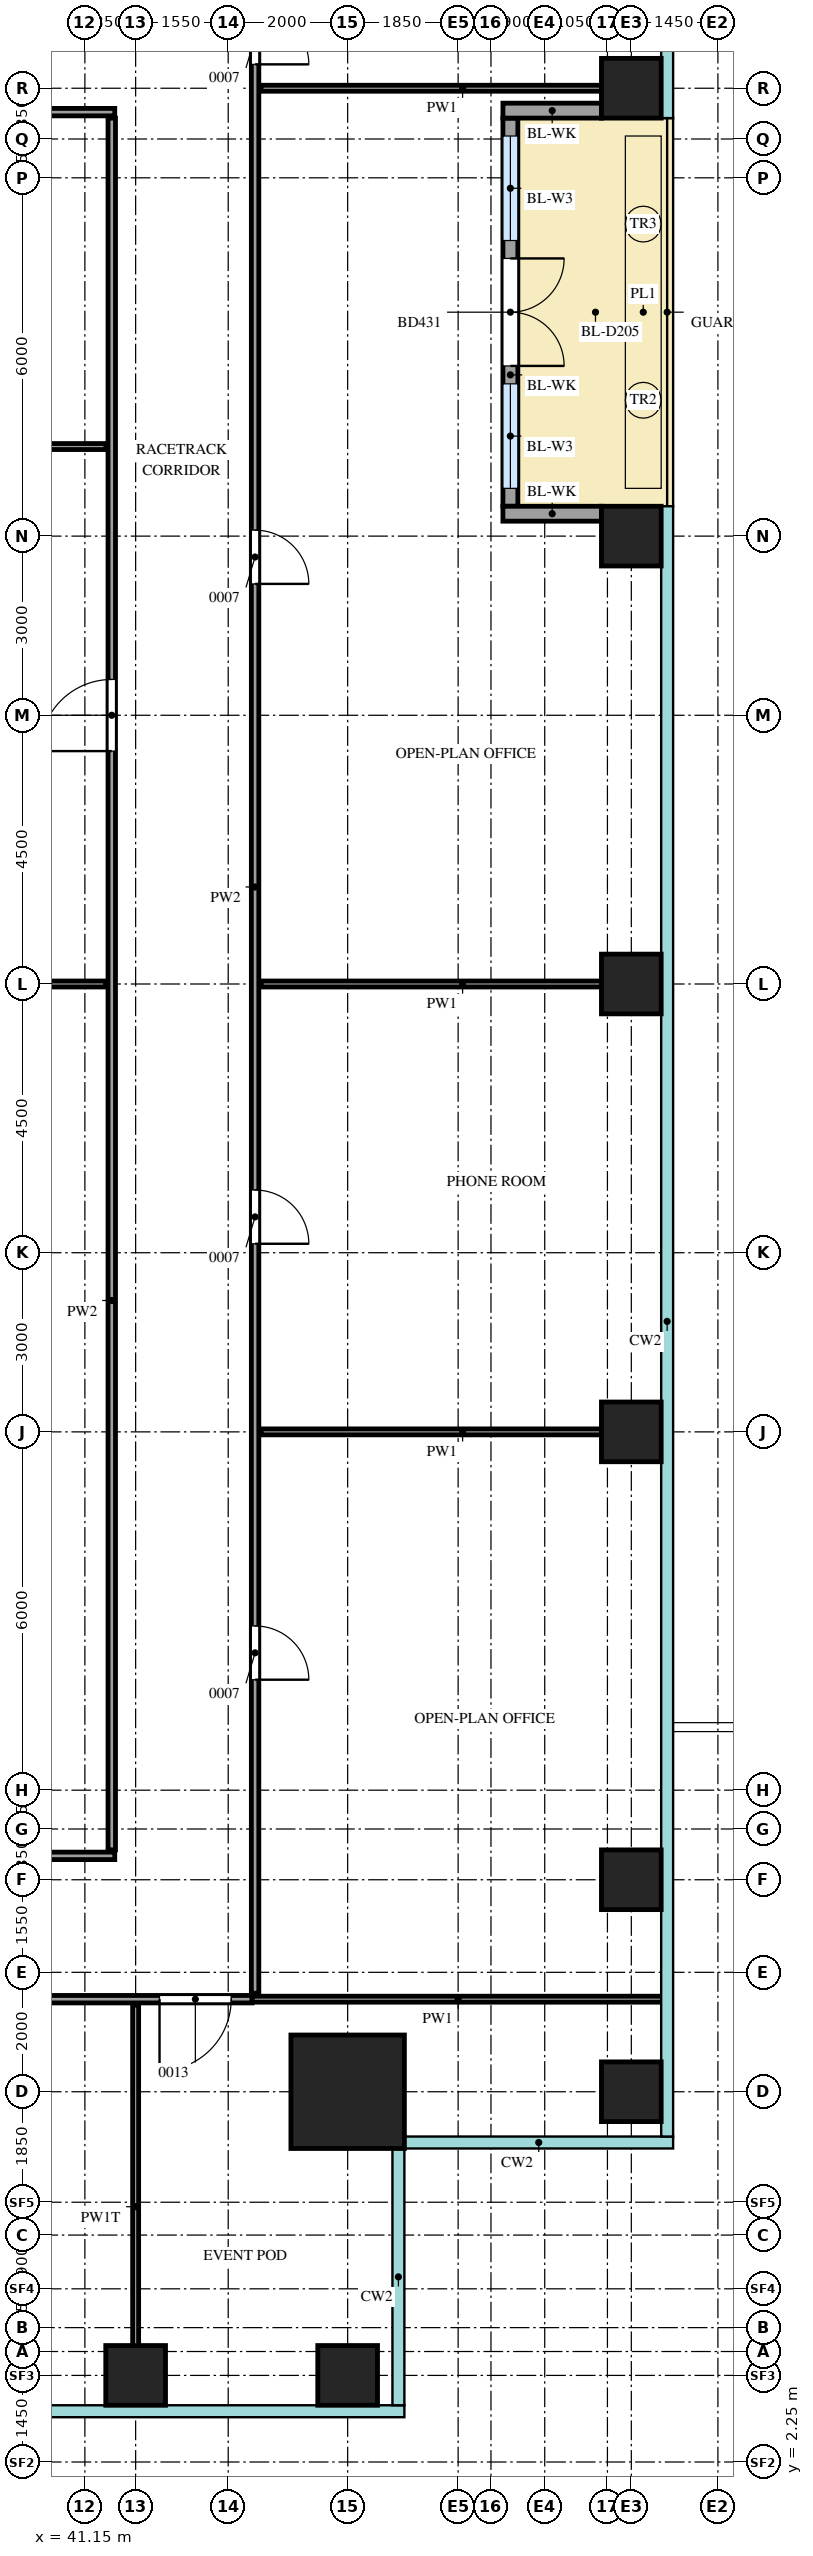
"""IFC4 building model, lengths in metres.
Left out: names, types, materials, properties, quantities, classifications, styles, units other than length and angle.
Written with IfcOpenShell. Run it as: python <this file> out.ifc"""

import sys

from ifc_helpers import new_model, si_unit, direction, frame, frame_2d, origin, origin_2d, place, context, subcontext, project, spatial, rectangle, extrude, source, transform, mapped, element, fill, save


model = new_model("IFC4")
c1 = context("Model", 3, precision=1e-05, world=origin(), true_north=direction((0.0, 1.0)))
c2 = subcontext(c1, "Body", "Model", "MODEL_VIEW")
j1 = project(units=[si_unit("LENGTHUNIT", "METRE"), si_unit("PLANEANGLEUNIT", "RADIAN")], contexts=[c1])
p1 = place(None, origin())
s1 = spatial("IfcSite", under=j1, at=p1, CompositionType="ELEMENT")
p2 = place(p1, origin())
s2 = spatial("IfcBuilding", under=s1, at=p2, CompositionType="ELEMENT")
p3 = place(p2, frame((0.0, 0.0, 196.7)))
s3 = spatial("IfcBuildingStorey", under=s2, at=p3, CompositionType="ELEMENT", Elevation=196.7)
m1 = source(origin(), c2, "Body", "SweptSolid", [
    extrude(rectangle(XDim=1.9, YDim=1.9, at=origin_2d()), origin(), (0.0, 0.0, 1.0), 4.0),
])
p4 = place(p3, frame((45.55, 8.45, 0.0), z_axis=(0.0, 0.0, 1.0), x_axis=(1.0, 0.0, 0.0)))
e1 = element("IfcColumn", 1, at=p4, inside=s3, PredefinedType="COLUMN", context=c2, shape_type="MappedRepresentation", body=[
    mapped(m1, transform((0.0, 0.0, 0.0))),
])
m2 = source(origin(), c2, "Body", "SweptSolid", [
    extrude(rectangle(XDim=1.0, YDim=1.0, at=origin_2d()), origin(), (0.0, 0.0, 1.0), 3.75),
])
for number, where, z_axis, x_axis in (
    (2, (42.0, 3.7, 0.0), (0.0, 0.0, 1.0), (1.0, 0.0, 0.0)),
    (3, (45.55, 3.7, 0.0), (0.0, 0.0, 1.0), (1.0, 0.0, 0.0)),
    (4, (50.3, 8.45, 0.0), (0.0, 0.0, 1.0), (1.0, 0.0, 0.0)),
    (5, (50.3, 12.0, 0.0), (0.0, 0.0, 1.0), (1.0, 0.0, 0.0)),
    (6, (50.3, 19.5, 0.0), (0.0, 0.0, 1.0), (1.0, 0.0, 0.0)),
    (7, (50.3, 27.0, 0.0), (0.0, 0.0, 1.0), (1.0, 0.0, 0.0)),
    (8, (50.3, 34.5, 0.0), (0.0, 0.0, 1.0), (1.0, 0.0, 0.0)),
    (9, (50.3, 42.0, 0.0), (0.0, 0.0, 1.0), (1.0, 0.0, 0.0)),
):
    element("IfcColumn", number, at=place(p3, frame(where, z_axis=z_axis, x_axis=x_axis)), inside=s3, PredefinedType="COLUMN", context=c2, shape_type="MappedRepresentation", body=[
        mapped(m2, transform((0.0, 0.0, 0.0))),
    ])
m3 = source(origin(), c2, "Body", "SweptSolid", [
    extrude(rectangle(XDim=6.5, YDim=0.25, at=frame_2d((3.25, 0.0))), origin(), (0.0, 0.0, 1.0), 3.15),
])
p5 = place(p3, frame((48.275, 35.0, 0.0), z_axis=(0.0, 0.0, 1.0), x_axis=(0.0, 1.0, 0.0)))
e10 = element("IfcWall", 10, at=p5, inside=s3, PredefinedType="SOLIDWALL", context=c2, shape_type="MappedRepresentation", body=[
    mapped(m3, transform((0.0, 0.0, 0.0))),
])
m4 = source(origin(), c2, "Body", "SweptSolid", [
    extrude(rectangle(XDim=1.75, YDim=2.4, at=frame_2d((0.875, 1.2))), frame((0.0, 0.135, 0.0), z_axis=(0.0, -1.0, 0.0), x_axis=(1.0, 0.0, 0.0)), (0.0, 0.0, 1.0), 0.27),
])
p6 = place(p5, frame((0.3, 0.0, 0.0)))
e11 = element("IfcOpeningElement", 11, at=p6, cuts=e10, PredefinedType="OPENING", context=c2, shape_type="MappedRepresentation", body=[
    mapped(m4, transform((0.0, 0.0, 0.0))),
])
p7 = place(p5, frame((4.45, 0.0, 0.0)))
e12 = element("IfcOpeningElement", 12, at=p7, cuts=e10, PredefinedType="OPENING", context=c2, shape_type="MappedRepresentation", body=[
    mapped(m4, transform((0.0, 0.0, 0.0))),
])
m5 = source(origin(), c2, "Body", "SweptSolid", [
    extrude(rectangle(XDim=1.8, YDim=2.4, at=frame_2d((0.9, 1.2))), frame((0.0, 0.135, 0.0), z_axis=(0.0, -1.0, 0.0), x_axis=(1.0, 0.0, 0.0)), (0.0, 0.0, 1.0), 0.27),
])
p8 = place(p5, frame((2.35, 0.0, 0.0)))
e13 = element("IfcOpeningElement", 13, at=p8, cuts=e10, PredefinedType="OPENING", context=c2, shape_type="MappedRepresentation", body=[
    mapped(m5, transform((0.0, 0.0, 0.0))),
])
m6 = source(origin(), c2, "Body", "SweptSolid", [
    extrude(rectangle(XDim=1.65, YDim=0.25, at=frame_2d((0.825, 0.0))), origin(), (0.0, 0.0, 1.0), 3.15),
])
for number, where, z_axis, x_axis in (
    (14, (49.8, 34.875, 0.0), (0.0, 0.0, 1.0), (-1.0, 0.0, 0.0)),
    (15, (49.8, 41.625, 0.0), (0.0, 0.0, 1.0), (-1.0, 0.0, 0.0)),
):
    element("IfcWall", number, at=place(p3, frame(where, z_axis=z_axis, x_axis=x_axis)), inside=s3, PredefinedType="SOLIDWALL", context=c2, shape_type="MappedRepresentation", body=[
        mapped(m6, transform((0.0, 0.0, 0.0))),
    ])
m7 = source(origin(), c2, "Body", "SweptSolid", [
    extrude(rectangle(XDim=6.75, YDim=0.1, at=frame_2d((3.375, 0.0))), origin(), (0.0, 0.0, 1.0), 3.3),
])
p9 = place(p3, frame((42.0, 3.15, 0.0), z_axis=(0.0, 0.0, 1.0), x_axis=(0.0, 1.0, 0.0)))
e16 = element("IfcWall", 16, at=p9, inside=s3, PredefinedType="PARTITIONING", context=c2, shape_type="MappedRepresentation", body=[
    mapped(m7, transform((0.0, 0.0, 0.0))),
])
m8 = source(origin(), c2, "Body", "SweptSolid", [
    extrude(rectangle(XDim=20.6, YDim=0.125, at=frame_2d((10.3, 0.0))), origin(), (0.0, 0.0, 1.0), 3.8),
])
p10 = place(p3, frame((23.35, 10.0, 0.0), z_axis=(0.0, 0.0, 1.0), x_axis=(1.0, 0.0, 0.0)))
e17 = element("IfcWall", 17, at=p10, inside=s3, PredefinedType="PARTITIONING", context=c2, shape_type="MappedRepresentation", body=[
    mapped(m8, transform((0.0, 0.0, 0.0))),
])
m9 = source(origin(), c2, "Body", "SweptSolid", [
    extrude(rectangle(XDim=0.9, YDim=2.1, at=frame_2d((0.45, 1.05))), frame((0.0, 0.073, 0.0), z_axis=(0.0, -1.0, 0.0), x_axis=(1.0, 0.0, 0.0)), (0.0, 0.0, 1.0), 0.145),
])
p11 = place(p10, frame((1.25, 0.0, 0.0)))
e18 = element("IfcOpeningElement", 18, at=p11, cuts=e17, PredefinedType="OPENING", context=c2, shape_type="MappedRepresentation", body=[
    mapped(m9, transform((0.0, 0.0, 0.0))),
])
m10 = source(origin(), c2, "Body", "SweptSolid", [
    extrude(rectangle(XDim=1.2, YDim=2.1, at=frame_2d((0.6, 1.05))), frame((0.0, 0.073, 0.0), z_axis=(0.0, -1.0, 0.0), x_axis=(1.0, 0.0, 0.0)), (0.0, 0.0, 1.0), 0.145),
])
p12 = place(p10, frame((10.55, 0.0, 0.0)))
e19 = element("IfcOpeningElement", 19, at=p12, cuts=e17, PredefinedType="OPENING", context=c2, shape_type="MappedRepresentation", body=[
    mapped(m10, transform((0.0, 0.0, 0.0))),
])
p13 = place(p10, frame((19.05, 0.0, 0.0)))
e20 = element("IfcOpeningElement", 20, at=p13, cuts=e17, PredefinedType="OPENING", context=c2, shape_type="MappedRepresentation", body=[
    mapped(m10, transform((0.0, 0.0, 0.0))),
])
m11 = source(origin(), c2, "Body", "SweptSolid", [
    extrude(rectangle(XDim=6.9, YDim=0.1, at=frame_2d((3.45, 0.0))), origin(), (0.0, 0.0, 1.0), 3.8),
])
p14 = place(p3, frame((43.95, 10.0, 0.0), z_axis=(0.0, 0.0, 1.0), x_axis=(1.0, 0.0, 0.0)))
e21 = element("IfcWall", 21, at=p14, inside=s3, PredefinedType="PARTITIONING", context=c2, shape_type="MappedRepresentation", body=[
    mapped(m11, transform((0.0, 0.0, 0.0))),
])
m12 = source(origin(), c2, "Body", "SweptSolid", [
    extrude(rectangle(XDim=33.8, YDim=0.125, at=frame_2d((16.9, 0.0))), origin(), (0.0, 0.0, 1.0), 3.8),
])
p15 = place(p3, frame((44.0, 10.1, 0.0), z_axis=(0.0, 0.0, 1.0), x_axis=(0.0, 1.0, 0.0)))
e22 = element("IfcWall", 22, at=p15, inside=s3, PredefinedType="PARTITIONING", context=c2, shape_type="MappedRepresentation", body=[
    mapped(m12, transform((0.0, 0.0, 0.0))),
])
p16 = place(p15, frame((5.25, 0.0, 0.0)))
e23 = element("IfcOpeningElement", 23, at=p16, cuts=e22, PredefinedType="OPENING", context=c2, shape_type="MappedRepresentation", body=[
    mapped(m9, transform((0.0, 0.0, 0.0))),
])
p17 = place(p15, frame((12.55, 0.0, 0.0)))
e24 = element("IfcOpeningElement", 24, at=p17, cuts=e22, PredefinedType="OPENING", context=c2, shape_type="MappedRepresentation", body=[
    mapped(m9, transform((0.0, 0.0, 0.0))),
])
p18 = place(p15, frame((23.6, 0.0, 0.0)))
e25 = element("IfcOpeningElement", 25, at=p18, cuts=e22, PredefinedType="OPENING", context=c2, shape_type="MappedRepresentation", body=[
    mapped(m9, transform((0.0, 0.0, 0.0))),
])
p19 = place(p15, frame((32.3, 0.0, 0.0)))
e26 = element("IfcOpeningElement", 26, at=p19, cuts=e22, PredefinedType="OPENING", context=c2, shape_type="MappedRepresentation", body=[
    mapped(m9, transform((0.0, 0.0, 0.0))),
])
m13 = source(origin(), c2, "Body", "SweptSolid", [
    extrude(rectangle(XDim=18.3, YDim=0.125, at=frame_2d((9.15, 0.0))), origin(), (0.0, 0.0, 1.0), 3.8),
])
p20 = place(p3, frame((23.35, 12.4, 0.0), z_axis=(0.0, 0.0, 1.0), x_axis=(1.0, 0.0, 0.0)))
e27 = element("IfcWall", 27, at=p20, inside=s3, PredefinedType="PARTITIONING", context=c2, shape_type="MappedRepresentation", body=[
    mapped(m13, transform((0.0, 0.0, 0.0))),
])
m14 = source(origin(), c2, "Body", "SweptSolid", [
    extrude(rectangle(XDim=29.0, YDim=0.125, at=frame_2d((14.5, 0.0))), origin(), (0.0, 0.0, 1.0), 3.8),
])
p21 = place(p3, frame((41.6, 12.5, 0.0), z_axis=(0.0, 0.0, 1.0), x_axis=(0.0, 1.0, 0.0)))
e28 = element("IfcWall", 28, at=p21, inside=s3, PredefinedType="PARTITIONING", context=c2, shape_type="MappedRepresentation", body=[
    mapped(m14, transform((0.0, 0.0, 0.0))),
])
p22 = place(p21, frame((18.4, 0.0, 0.0)))
e29 = element("IfcOpeningElement", 29, at=p22, cuts=e28, PredefinedType="OPENING", context=c2, shape_type="MappedRepresentation", body=[
    mapped(m10, transform((0.0, 0.0, 0.0))),
])
m15 = source(origin(), c2, "Body", "SweptSolid", [
    extrude(rectangle(XDim=6.75, YDim=0.1, at=frame_2d((3.375, 0.0))), origin(), (0.0, 0.0, 1.0), 3.8),
])
p23 = place(p3, frame((44.1, 19.5, 0.0), z_axis=(0.0, 0.0, 1.0), x_axis=(1.0, 0.0, 0.0)))
e30 = element("IfcWall", 30, at=p23, inside=s3, PredefinedType="PARTITIONING", context=c2, shape_type="MappedRepresentation", body=[
    mapped(m15, transform((0.0, 0.0, 0.0))),
])
m16 = source(origin(), c2, "Body", "SweptSolid", [
    extrude(rectangle(XDim=18.0, YDim=0.1, at=frame_2d((9.0, 0.0))), origin(), (0.0, 0.0, 1.0), 3.8),
])
p24 = place(p3, frame((23.5, 27.0, 0.0), z_axis=(0.0, 0.0, 1.0), x_axis=(1.0, 0.0, 0.0)))
e31 = element("IfcWall", 31, at=p24, inside=s3, PredefinedType="PARTITIONING", context=c2, shape_type="MappedRepresentation", body=[
    mapped(m16, transform((0.0, 0.0, 0.0))),
])
p25 = place(p3, frame((44.1, 27.0, 0.0), z_axis=(0.0, 0.0, 1.0), x_axis=(1.0, 0.0, 0.0)))
e32 = element("IfcWall", 32, at=p25, inside=s3, PredefinedType="PARTITIONING", context=c2, shape_type="MappedRepresentation", body=[
    mapped(m15, transform((0.0, 0.0, 0.0))),
])
m17 = source(origin(), c2, "Body", "SweptSolid", [
    extrude(rectangle(XDim=10.95, YDim=0.1, at=frame_2d((5.475, 0.0))), origin(), (0.0, 0.0, 1.0), 3.8),
])
p26 = place(p3, frame((30.55, 36.0, 0.0), z_axis=(0.0, 0.0, 1.0), x_axis=(1.0, 0.0, 0.0)))
e33 = element("IfcWall", 33, at=p26, inside=s3, PredefinedType="PARTITIONING", context=c2, shape_type="MappedRepresentation", body=[
    mapped(m17, transform((0.0, 0.0, 0.0))),
])
m18 = source(origin(), c2, "Body", "SweptSolid", [
    extrude(rectangle(XDim=11.1, YDim=0.125, at=frame_2d((5.55, 0.0))), origin(), (0.0, 0.0, 1.0), 3.8),
])
p27 = place(p3, frame((30.55, 41.6, 0.0), z_axis=(0.0, 0.0, 1.0), x_axis=(1.0, 0.0, 0.0)))
e34 = element("IfcWall", 34, at=p27, inside=s3, PredefinedType="PARTITIONING", context=c2, shape_type="MappedRepresentation", body=[
    mapped(m18, transform((0.0, 0.0, 0.0))),
])
p28 = place(p27, frame((5.25, 0.0, 0.0)))
e35 = element("IfcOpeningElement", 35, at=p28, cuts=e34, PredefinedType="OPENING", context=c2, shape_type="MappedRepresentation", body=[
    mapped(m9, transform((0.0, 0.0, 0.0))),
])
p29 = place(p3, frame((44.1, 42.0, 0.0), z_axis=(0.0, 0.0, 1.0), x_axis=(1.0, 0.0, 0.0)))
e36 = element("IfcWall", 36, at=p29, inside=s3, PredefinedType="PARTITIONING", context=c2, shape_type="MappedRepresentation", body=[
    mapped(m15, transform((0.0, 0.0, 0.0))),
])
m19 = source(origin(), c2, "Body", "SweptSolid", [
    extrude(rectangle(XDim=1.75, YDim=2.4, at=frame_2d((0.875, 1.2))), frame((0.0, 0.03, 0.0), z_axis=(0.0, -1.0, 0.0), x_axis=(1.0, 0.0, 0.0)), (0.0, 0.0, 1.0), 0.06),
])
p30 = place(p6, origin())
e37 = element("IfcWindow", 37, at=p30, inside=s3, PartitioningType="SINGLE_PANEL", PredefinedType="WINDOW", context=c2, shape_type="MappedRepresentation", body=[
    mapped(m19, transform((0.0, 0.0, 0.0))),
])
fill(e11, e37)
p31 = place(p7, origin())
e38 = element("IfcWindow", 38, at=p31, inside=s3, PartitioningType="SINGLE_PANEL", PredefinedType="WINDOW", context=c2, shape_type="MappedRepresentation", body=[
    mapped(m19, transform((0.0, 0.0, 0.0))),
])
fill(e12, e38)
m20 = source(origin(), c2, "Body", "SweptSolid", [
    extrude(rectangle(XDim=1.8, YDim=2.4, at=frame_2d((0.9, 1.2))), frame((0.0, 0.025, 0.0), z_axis=(0.0, -1.0, 0.0), x_axis=(1.0, 0.0, 0.0)), (0.0, 0.0, 1.0), 0.05),
])
p32 = place(p8, origin())
e39 = element("IfcDoor", 39, at=p32, inside=s3, OperationType="DOUBLE_DOOR_DOUBLE_SWING", PredefinedType="DOOR", context=c2, shape_type="MappedRepresentation", body=[
    mapped(m20, transform((0.0, 0.0, 0.0))),
])
fill(e13, e39)
m21 = source(origin(), c2, "Body", "SweptSolid", [
    extrude(rectangle(XDim=1.2, YDim=2.1, at=frame_2d((0.6, 1.05))), frame((0.0, 0.025, 0.0), z_axis=(0.0, -1.0, 0.0), x_axis=(1.0, 0.0, 0.0)), (0.0, 0.0, 1.0), 0.05),
])
p33 = place(p13, origin())
e40 = element("IfcDoor", 40, at=p33, inside=s3, OperationType="SINGLE_SWING_LEFT", PredefinedType="DOOR", context=c2, shape_type="MappedRepresentation", body=[
    mapped(m21, transform((0.0, 0.0, 0.0))),
])
fill(e20, e40)
m22 = source(origin(), c2, "Body", "SweptSolid", [
    extrude(rectangle(XDim=0.9, YDim=2.1, at=frame_2d((0.45, 1.05))), frame((0.0, 0.025, 0.0), z_axis=(0.0, -1.0, 0.0), x_axis=(1.0, 0.0, 0.0)), (0.0, 0.0, 1.0), 0.05),
])
p34 = place(p16, origin())
e41 = element("IfcDoor", 41, at=p34, inside=s3, OperationType="SINGLE_SWING_LEFT", PredefinedType="DOOR", context=c2, shape_type="MappedRepresentation", body=[
    mapped(m22, transform((0.0, 0.0, 0.0))),
])
fill(e23, e41)
p35 = place(p17, origin())
e42 = element("IfcDoor", 42, at=p35, inside=s3, OperationType="SINGLE_SWING_LEFT", PredefinedType="DOOR", context=c2, shape_type="MappedRepresentation", body=[
    mapped(m22, transform((0.0, 0.0, 0.0))),
])
fill(e24, e42)
p36 = place(p18, origin())
e43 = element("IfcDoor", 43, at=p36, inside=s3, OperationType="SINGLE_SWING_LEFT", PredefinedType="DOOR", context=c2, shape_type="MappedRepresentation", body=[
    mapped(m22, transform((0.0, 0.0, 0.0))),
])
fill(e25, e43)
p37 = place(p19, origin())
e44 = element("IfcDoor", 44, at=p37, inside=s3, OperationType="SINGLE_SWING_LEFT", PredefinedType="DOOR", context=c2, shape_type="MappedRepresentation", body=[
    mapped(m22, transform((0.0, 0.0, 0.0))),
])
fill(e26, e44)
p38 = place(p22, origin())
e45 = element("IfcDoor", 45, at=p38, inside=s3, OperationType="SINGLE_SWING_RIGHT", PredefinedType="DOOR", context=c2, shape_type="MappedRepresentation", body=[
    mapped(m21, transform((0.0, 0.0, 0.0))),
])
fill(e29, e45)
save(model, sys.argv[1])
